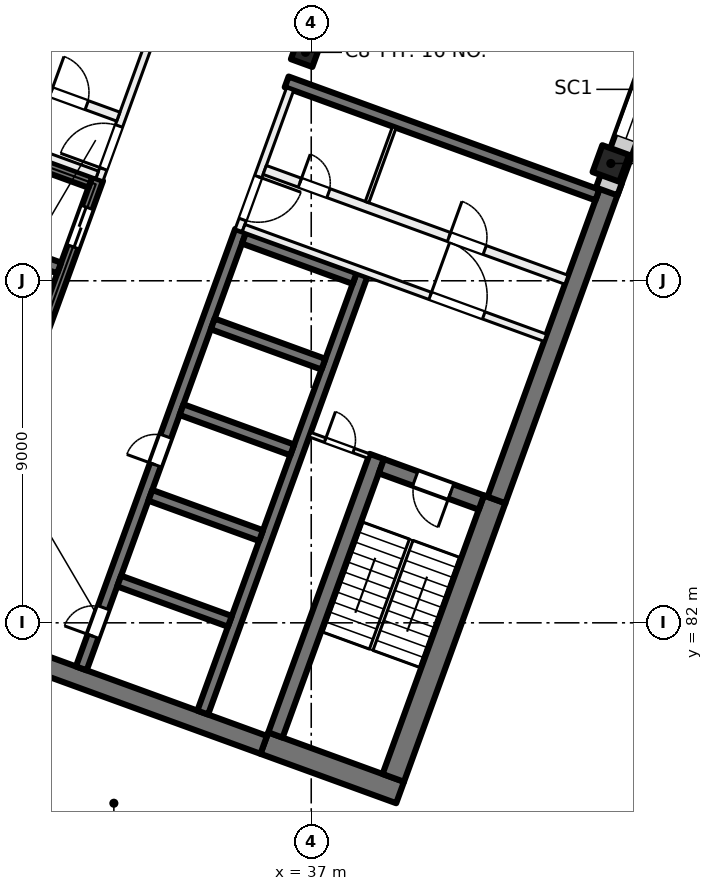
"""IFC4 building model, lengths in metres.
Left out: names, types, materials, properties, quantities, classifications, styles, units other than length and angle.
Written with IfcOpenShell. Run it as: python <this file> out.ifc"""

import sys

from ifc_helpers import new_model, si_unit, direction, frame, frame_2d, origin, origin_2d, place, context, subcontext, project, spatial, rectangle, extrude, element, fill, save


model = new_model("IFC4")
c1 = context("Model", 3, precision=1e-05, world=origin(), true_north=direction((0.0, 1.0)))
c2 = subcontext(c1, "Body", "Model", "MODEL_VIEW")
j1 = project(units=[si_unit("LENGTHUNIT", "METRE"), si_unit("PLANEANGLEUNIT", "RADIAN")], contexts=[c1])
p1 = place(None, origin())
s1 = spatial("IfcSite", under=j1, at=p1, CompositionType="ELEMENT")
p2 = place(p1, origin())
s2 = spatial("IfcBuilding", under=s1, at=p2, CompositionType="ELEMENT")
p3 = place(p2, frame((0.0, 0.0, 192.0)))
s3 = spatial("IfcBuildingStorey", under=s2, at=p3, CompositionType="ELEMENT", Elevation=192.0)
p4 = place(p3, frame((36.849, 97.011, 0.0), z_axis=(0.0, 0.0, 1.0), x_axis=(-0.342020143326, -0.939692620786, 0.0)))
e1 = element("IfcColumn", 1, at=p4, inside=s3, PredefinedType="COLUMN", context=c2, shape_type="SweptSolid", body=[
    extrude(rectangle(XDim=0.6, YDim=0.6, at=origin_2d()), origin(), (0.0, 0.0, 1.0), 4.0),
])
p5 = place(p3, frame((44.884, 94.087, 0.0), z_axis=(0.0, 0.0, 1.0), x_axis=(-0.342020143326, -0.939692620786, 0.0)))
e2 = element("IfcColumn", 2, at=p5, inside=s3, PredefinedType="COLUMN", context=c2, shape_type="SweptSolid", body=[
    extrude(rectangle(XDim=0.75, YDim=0.75, at=origin_2d()), origin(), (0.0, 0.0, 1.0), 4.0),
])
p6 = place(p3, frame((39.338, 77.535, 0.0), z_axis=(0.0, 0.0, 1.0), x_axis=(-0.939701471648, 0.341995824804, 0.0)))
e3 = element("IfcWall", 3, at=p6, inside=s3, PredefinedType="SHEAR", context=c2, shape_type="SweptSolid", body=[
    extrude(rectangle(XDim=3.8, YDim=0.6, at=frame_2d((1.9, 0.0))), origin(), (0.0, 0.0, 1.0), 4.0),
])
p7 = place(p3, frame((35.75, 78.788, 0.0), z_axis=(0.0, 0.0, 1.0), x_axis=(-0.939692894512, 0.342019391267, 0.0)))
e4 = element("IfcWall", 4, at=p7, inside=s3, PredefinedType="SHEAR", context=c2, shape_type="SweptSolid", body=[
    extrude(rectangle(XDim=14.4, YDim=0.5, at=frame_2d((7.2, 0.0))), origin(), (0.0, 0.0, 1.0), 4.0),
])
p8 = place(p3, frame((39.159, 77.92, 0.0), z_axis=(0.0, 0.0, 1.0), x_axis=(0.342016982193, 0.939693771338, 0.0)))
e5 = element("IfcWall", 5, at=p8, inside=s3, PredefinedType="SHEAR", context=c2, shape_type="SweptSolid", body=[
    extrude(rectangle(XDim=7.8, YDim=0.6, at=frame_2d((3.9, 0.0))), origin(), (0.0, 0.0, 1.0), 4.0),
])
p9 = place(p3, frame((41.874, 85.232, 0.0), z_axis=(0.0, 0.0, 1.0), x_axis=(0.342020437038, 0.939692513883, 0.0)))
e6 = element("IfcWall", 6, at=p9, inside=s3, PredefinedType="SHEAR", context=c2, shape_type="SweptSolid", body=[
    extrude(rectangle(XDim=8.975, YDim=0.5, at=frame_2d((4.487, 0.0))), origin(), (0.0, 0.0, 1.0), 4.0),
])
p10 = place(p3, frame((36.058, 79.048, 0.0), z_axis=(0.0, 0.0, 1.0), x_axis=(0.342016982193, 0.939693771338, 0.0)))
e7 = element("IfcWall", 7, at=p10, inside=s3, PredefinedType="SHEAR", context=c2, shape_type="SweptSolid", body=[
    extrude(rectangle(XDim=7.8, YDim=0.4, at=frame_2d((3.9, 0.0))), origin(), (0.0, 0.0, 1.0), 4.0),
])
p11 = place(p3, frame((41.476, 85.164, 0.0), z_axis=(0.0, 0.0, 1.0), x_axis=(-0.939678810556, 0.342058084236, 0.0)))
e8 = element("IfcWall", 8, at=p11, inside=s3, PredefinedType="SHEAR", context=c2, shape_type="SweptSolid", body=[
    extrude(rectangle(XDim=2.8, YDim=0.4, at=frame_2d((1.4, 0.0))), origin(), (0.0, 0.0, 1.0), 4.0),
])
p12 = place(p11, frame((0.85, 0.0, 0.0)))
e9 = element("IfcOpeningElement", 9, at=p12, cuts=e8, PredefinedType="OPENING", context=c2, shape_type="SweptSolid", body=[
    extrude(rectangle(XDim=1.0, YDim=2.1, at=frame_2d((0.5, 1.05))), frame((0.0, 0.21, 0.0), z_axis=(0.0, -1.0, 0.0), x_axis=(1.0, 0.0, 0.0)), (0.0, 0.0, 1.0), 0.42),
])
p13 = place(p3, frame((30.949, 80.801, 0.0), z_axis=(0.0, 0.0, 1.0), x_axis=(0.342016684409, 0.939693879721, 0.0)))
e10 = element("IfcWall", 10, at=p13, inside=s3, PredefinedType="SHEAR", context=c2, shape_type="SweptSolid", body=[
    extrude(rectangle(XDim=12.25, YDim=0.3, at=frame_2d((6.125, 0.0))), origin(), (0.0, 0.0, 1.0), 4.0),
])
p14 = place(p13, frame((0.9, 0.0, 0.0)))
e11 = element("IfcOpeningElement", 11, at=p14, cuts=e10, PredefinedType="OPENING", context=c2, shape_type="SweptSolid", body=[
    extrude(rectangle(XDim=0.8, YDim=2.1, at=frame_2d((0.4, 1.05))), frame((0.0, 0.16, 0.0), z_axis=(0.0, -1.0, 0.0), x_axis=(1.0, 0.0, 0.0)), (0.0, 0.0, 1.0), 0.32),
])
p15 = place(p13, frame((5.7, 0.0, 0.0)))
e12 = element("IfcOpeningElement", 12, at=p15, cuts=e10, PredefinedType="OPENING", context=c2, shape_type="SweptSolid", body=[
    extrude(rectangle(XDim=0.8, YDim=2.1, at=frame_2d((0.4, 1.05))), frame((0.0, 0.16, 0.0), z_axis=(0.0, -1.0, 0.0), x_axis=(1.0, 0.0, 0.0)), (0.0, 0.0, 1.0), 0.32),
])
p16 = place(p3, frame((34.144, 79.638, 0.0), z_axis=(0.0, 0.0, 1.0), x_axis=(0.342016684409, 0.939693879721, 0.0)))
e13 = element("IfcWall", 13, at=p16, inside=s3, PredefinedType="SHEAR", context=c2, shape_type="SweptSolid", body=[
    extrude(rectangle(XDim=12.25, YDim=0.3, at=frame_2d((6.125, 0.0))), origin(), (0.0, 0.0, 1.0), 4.0),
])
p17 = place(p3, frame((34.858, 82.039, 0.0), z_axis=(0.0, 0.0, 1.0), x_axis=(-0.939689908313, 0.342027595692, 0.0)))
e14 = element("IfcWall", 14, at=p17, inside=s3, PredefinedType="SHEAR", context=c2, shape_type="SweptSolid", body=[
    extrude(rectangle(XDim=3.1, YDim=0.3, at=frame_2d((1.55, 0.0))), origin(), (0.0, 0.0, 1.0), 4.0),
])
p18 = place(p3, frame((35.679, 84.294, 0.0), z_axis=(0.0, 0.0, 1.0), x_axis=(-0.939706007505, 0.341983361377, 0.0)))
e15 = element("IfcWall", 15, at=p18, inside=s3, PredefinedType="SHEAR", context=c2, shape_type="SweptSolid", body=[
    extrude(rectangle(XDim=3.1, YDim=0.3, at=frame_2d((1.55, 0.0))), origin(), (0.0, 0.0, 1.0), 4.0),
])
for number, where, z_axis, x_axis in (
    (16, (36.5, 86.549, 0.0), (0.0, 0.0, 1.0), (-0.94, 0.342, 0.0)),
    (17, (37.321, 88.805, 0.0), (0.0, 0.0, 1.0), (-0.94, 0.342, 0.0)),
    (18, (38.142, 91.06, 0.0), (0.0, 0.0, 1.0), (-0.94, 0.342, 0.0)),
):
    element("IfcWall", number, at=place(p3, frame(where, z_axis=z_axis, x_axis=x_axis)), inside=s3, PredefinedType="SHEAR", context=c2, shape_type="SweptSolid", body=[
        extrude(rectangle(XDim=3.1, YDim=0.3, at=frame_2d((1.55, 0.0))), origin(), (0.0, 0.0, 1.0), 4.0),
    ])
p19 = place(p3, frame((27.191, 82.169, 0.0), z_axis=(0.0, 0.0, 1.0), x_axis=(0.342016684409, 0.939693879721, 0.0)))
e19 = element("IfcWall", 19, at=p19, inside=s3, PredefinedType="SHEAR", context=c2, shape_type="SweptSolid", body=[
    extrude(rectangle(XDim=12.25, YDim=0.3, at=frame_2d((6.125, 0.0))), origin(), (0.0, 0.0, 1.0), 4.0),
])
p20 = place(p19, frame((0.75, 0.0, 0.0)))
e20 = element("IfcOpeningElement", 20, at=p20, cuts=e19, PredefinedType="OPENING", context=c2, shape_type="SweptSolid", body=[
    extrude(rectangle(XDim=1.1, YDim=2.1, at=frame_2d((0.55, 1.05))), frame((0.0, 0.16, 0.0), z_axis=(0.0, -1.0, 0.0), x_axis=(1.0, 0.0, 0.0)), (0.0, 0.0, 1.0), 0.32),
])
p21 = place(p19, frame((3.15, 0.0, 0.0)))
e21 = element("IfcOpeningElement", 21, at=p21, cuts=e19, PredefinedType="OPENING", context=c2, shape_type="SweptSolid", body=[
    extrude(rectangle(XDim=1.1, YDim=2.1, at=frame_2d((0.55, 1.05))), frame((0.0, 0.16, 0.0), z_axis=(0.0, -1.0, 0.0), x_axis=(1.0, 0.0, 0.0)), (0.0, 0.0, 1.0), 0.32),
])
p22 = place(p19, frame((5.55, 0.0, 0.0)))
e22 = element("IfcOpeningElement", 22, at=p22, cuts=e19, PredefinedType="OPENING", context=c2, shape_type="SweptSolid", body=[
    extrude(rectangle(XDim=1.1, YDim=2.1, at=frame_2d((0.55, 1.05))), frame((0.0, 0.16, 0.0), z_axis=(0.0, -1.0, 0.0), x_axis=(1.0, 0.0, 0.0)), (0.0, 0.0, 1.0), 0.32),
])
p23 = place(p19, frame((10.35, 0.0, 0.0)))
e23 = element("IfcOpeningElement", 23, at=p23, cuts=e19, PredefinedType="OPENING", context=c2, shape_type="SweptSolid", body=[
    extrude(rectangle(XDim=1.1, YDim=2.1, at=frame_2d((0.55, 1.05))), frame((0.0, 0.16, 0.0), z_axis=(0.0, -1.0, 0.0), x_axis=(1.0, 0.0, 0.0)), (0.0, 0.0, 1.0), 0.32),
])
for number, where, z_axis, x_axis in (
    (24, (30.367, 91.336, 0.0), (0.0, 0.0, 1.0), (-0.94, 0.342, 0.0)),
    (25, (31.188, 93.591, 0.0), (0.0, 0.0, 1.0), (-0.94, 0.342, 0.0)),
):
    element("IfcWall", number, at=place(p3, frame(where, z_axis=z_axis, x_axis=x_axis)), inside=s3, PredefinedType="SHEAR", context=c2, shape_type="SweptSolid", body=[
        extrude(rectangle(XDim=3.1, YDim=0.3, at=frame_2d((1.55, 0.0))), origin(), (0.0, 0.0, 1.0), 4.0),
    ])
p24 = place(p3, frame((44.529, 93.258, 0.0), z_axis=(0.0, 0.0, 1.0), x_axis=(-0.9396917844, 0.342022441267, 0.0)))
e26 = element("IfcWall", 26, at=p24, inside=s3, PredefinedType="SHEAR", context=c2, shape_type="SweptSolid", body=[
    extrude(rectangle(XDim=8.7, YDim=0.3, at=frame_2d((4.35, 0.0))), origin(), (0.0, 0.0, 1.0), 4.0),
])
p25 = place(p3, frame((52.212, 113.783, 0.0), z_axis=(0.0, 0.0, 1.0), x_axis=(-0.34202521188, -0.939690775968, 0.0)))
e27 = element("IfcWall", 27, at=p25, inside=s3, PredefinedType="SOLIDWALL", context=c2, shape_type="SweptSolid", body=[
    extrude(rectangle(XDim=21.745, YDim=0.6, at=frame_2d((10.873, 0.0))), origin(), (0.0, 0.0, 1.0), 3.625),
])
p26 = place(p25, frame((4.365, 0.0, 0.0)))
e28 = element("IfcOpeningElement", 28, at=p26, cuts=e27, PredefinedType="OPENING", context=c2, shape_type="SweptSolid", body=[
    extrude(rectangle(XDim=1.8, YDim=2.4, at=frame_2d((0.9, 1.2))), frame((0.0, 0.31, 0.0), z_axis=(0.0, -1.0, 0.0), x_axis=(1.0, 0.0, 0.0)), (0.0, 0.0, 1.0), 0.62),
])
p27 = place(p25, frame((8.265, 0.0, 0.9)))
e29 = element("IfcOpeningElement", 29, at=p27, cuts=e27, PredefinedType="OPENING", context=c2, shape_type="SweptSolid", body=[
    extrude(rectangle(XDim=3.0, YDim=2.4, at=frame_2d((1.5, 1.2))), frame((0.0, 0.31, 0.0), z_axis=(0.0, -1.0, 0.0), x_axis=(1.0, 0.0, 0.0)), (0.0, 0.0, 1.0), 0.62),
])
p28 = place(p25, frame((12.765, 0.0, 0.9)))
e30 = element("IfcOpeningElement", 30, at=p28, cuts=e27, PredefinedType="OPENING", context=c2, shape_type="SweptSolid", body=[
    extrude(rectangle(XDim=3.0, YDim=2.4, at=frame_2d((1.5, 1.2))), frame((0.0, 0.31, 0.0), z_axis=(0.0, -1.0, 0.0), x_axis=(1.0, 0.0, 0.0)), (0.0, 0.0, 1.0), 0.62),
])
p29 = place(p25, frame((17.265, 0.0, 0.9)))
e31 = element("IfcOpeningElement", 31, at=p29, cuts=e27, PredefinedType="OPENING", context=c2, shape_type="SweptSolid", body=[
    extrude(rectangle(XDim=3.0, YDim=2.4, at=frame_2d((1.5, 1.2))), frame((0.0, 0.31, 0.0), z_axis=(0.0, -1.0, 0.0), x_axis=(1.0, 0.0, 0.0)), (0.0, 0.0, 1.0), 0.62),
])
p30 = place(p3, frame((31.427, 93.663, 0.0), z_axis=(0.0, 0.0, 1.0), x_axis=(0.342030870568, 0.93968871632, 0.0)))
e32 = element("IfcWall", 32, at=p30, inside=s3, PredefinedType="PARTITIONING", context=c2, shape_type="SweptSolid", body=[
    extrude(rectangle(XDim=3.95, YDim=0.2, at=frame_2d((1.975, 0.0))), origin(), (0.0, 0.0, 1.0), 3.625),
])
p31 = place(p30, frame((0.3, 0.0, 0.0)))
e33 = element("IfcOpeningElement", 33, at=p31, cuts=e32, PredefinedType="OPENING", context=c2, shape_type="SweptSolid", body=[
    extrude(rectangle(XDim=1.2, YDim=2.1, at=frame_2d((0.6, 1.05))), frame((0.0, 0.11, 0.0), z_axis=(0.0, -1.0, 0.0), x_axis=(1.0, 0.0, 0.0)), (0.0, 0.0, 1.0), 0.22),
])
p32 = place(p3, frame((23.427, 96.682, 0.0), z_axis=(0.0, 0.0, 1.0), x_axis=(0.939690465531, -0.342026064782, 0.0)))
e34 = element("IfcWall", 34, at=p32, inside=s3, PredefinedType="PARTITIONING", context=c2, shape_type="SweptSolid", body=[
    extrude(rectangle(XDim=8.45, YDim=0.2, at=frame_2d((4.225, 0.0))), origin(), (0.0, 0.0, 1.0), 3.625),
])
p33 = place(p32, frame((1.725, 0.0, 0.0)))
e35 = element("IfcOpeningElement", 35, at=p33, cuts=e34, PredefinedType="OPENING", context=c2, shape_type="SweptSolid", body=[
    extrude(rectangle(XDim=1.5, YDim=2.1, at=frame_2d((0.75, 1.05))), frame((0.0, 0.11, 0.0), z_axis=(0.0, -1.0, 0.0), x_axis=(1.0, 0.0, 0.0)), (0.0, 0.0, 1.0), 0.22),
])
p34 = place(p3, frame((23.983, 98.208, 0.0), z_axis=(0.0, 0.0, 1.0), x_axis=(0.939699751196, -0.342000552051, 0.0)))
e36 = element("IfcWall", 36, at=p34, inside=s3, PredefinedType="PARTITIONING", context=c2, shape_type="SweptSolid", body=[
    extrude(rectangle(XDim=8.45, YDim=0.25, at=frame_2d((4.225, 0.0))), origin(), (0.0, 0.0, 1.0), 3.625),
])
p35 = place(p34, frame((6.565, 0.0, 0.0)))
e37 = element("IfcOpeningElement", 37, at=p35, cuts=e36, PredefinedType="OPENING", context=c2, shape_type="SweptSolid", body=[
    extrude(rectangle(XDim=1.0, YDim=2.1, at=frame_2d((0.5, 1.05))), frame((0.0, 0.135, 0.0), z_axis=(0.0, -1.0, 0.0), x_axis=(1.0, 0.0, 0.0)), (0.0, 0.0, 1.0), 0.27),
])
p36 = place(p34, frame((2.39, 0.0, 0.0)))
e38 = element("IfcOpeningElement", 38, at=p36, cuts=e36, PredefinedType="OPENING", context=c2, shape_type="SweptSolid", body=[
    extrude(rectangle(XDim=0.8, YDim=2.1, at=frame_2d((0.4, 1.05))), frame((0.0, 0.135, 0.0), z_axis=(0.0, -1.0, 0.0), x_axis=(1.0, 0.0, 0.0)), (0.0, 0.0, 1.0), 0.27),
])
p37 = place(p3, frame((36.443, 96.041, 0.0), z_axis=(0.0, 0.0, 1.0), x_axis=(-0.341996156931, -0.939701350773, 0.0)))
e39 = element("IfcWall", 39, at=p37, inside=s3, PredefinedType="PARTITIONING", context=c2, shape_type="SweptSolid", body=[
    extrude(rectangle(XDim=3.95, YDim=0.2, at=frame_2d((1.975, 0.0))), origin(), (0.0, 0.0, 1.0), 3.625),
])
p38 = place(p37, frame((2.45, 0.0, 0.0)))
e40 = element("IfcOpeningElement", 40, at=p38, cuts=e39, PredefinedType="OPENING", context=c2, shape_type="SweptSolid", body=[
    extrude(rectangle(XDim=1.2, YDim=2.1, at=frame_2d((0.6, 1.05))), frame((0.0, 0.11, 0.0), z_axis=(0.0, -1.0, 0.0), x_axis=(1.0, 0.0, 0.0)), (0.0, 0.0, 1.0), 0.22),
])
p39 = place(p3, frame((35.22, 92.389, 0.0), z_axis=(0.0, 0.0, 1.0), x_axis=(0.939690465531, -0.342026064782, 0.0)))
e41 = element("IfcWall", 41, at=p39, inside=s3, PredefinedType="PARTITIONING", context=c2, shape_type="SweptSolid", body=[
    extrude(rectangle(XDim=8.45, YDim=0.2, at=frame_2d((4.225, 0.0))), origin(), (0.0, 0.0, 1.0), 3.625),
])
p40 = place(p39, frame((5.225, 0.0, 0.0)))
e42 = element("IfcOpeningElement", 42, at=p40, cuts=e41, PredefinedType="OPENING", context=c2, shape_type="SweptSolid", body=[
    extrude(rectangle(XDim=1.5, YDim=2.1, at=frame_2d((0.75, 1.05))), frame((0.0, 0.11, 0.0), z_axis=(0.0, -1.0, 0.0), x_axis=(1.0, 0.0, 0.0)), (0.0, 0.0, 1.0), 0.22),
])
p41 = place(p3, frame((35.776, 93.916, 0.0), z_axis=(0.0, 0.0, 1.0), x_axis=(0.939690465531, -0.342026064782, 0.0)))
e43 = element("IfcWall", 43, at=p41, inside=s3, PredefinedType="PARTITIONING", context=c2, shape_type="SweptSolid", body=[
    extrude(rectangle(XDim=8.45, YDim=0.25, at=frame_2d((4.225, 0.0))), origin(), (0.0, 0.0, 1.0), 3.625),
])
p42 = place(p41, frame((0.985, 0.0, 0.0)))
e44 = element("IfcOpeningElement", 44, at=p42, cuts=e43, PredefinedType="OPENING", context=c2, shape_type="SweptSolid", body=[
    extrude(rectangle(XDim=0.8, YDim=2.1, at=frame_2d((0.4, 1.05))), frame((0.0, 0.135, 0.0), z_axis=(0.0, -1.0, 0.0), x_axis=(1.0, 0.0, 0.0)), (0.0, 0.0, 1.0), 0.27),
])
p43 = place(p41, frame((5.16, 0.0, 0.0)))
e45 = element("IfcOpeningElement", 45, at=p43, cuts=e43, PredefinedType="OPENING", context=c2, shape_type="SweptSolid", body=[
    extrude(rectangle(XDim=1.0, YDim=2.1, at=frame_2d((0.5, 1.05))), frame((0.0, 0.135, 0.0), z_axis=(0.0, -1.0, 0.0), x_axis=(1.0, 0.0, 0.0)), (0.0, 0.0, 1.0), 0.27),
])
p44 = place(p3, frame((36.966, 86.952, 0.0), z_axis=(0.0, 0.0, 1.0), x_axis=(0.939672407396, -0.342075674051, 0.0)))
e46 = element("IfcWall", 46, at=p44, inside=s3, PredefinedType="PARTITIONING", context=c2, shape_type="SweptSolid", body=[
    extrude(rectangle(XDim=1.65, YDim=0.125, at=frame_2d((0.825, 0.0))), origin(), (0.0, 0.0, 1.0), 3.625),
])
p45 = place(p44, frame((0.425, 0.0, 0.0)))
e47 = element("IfcOpeningElement", 47, at=p45, cuts=e46, PredefinedType="OPENING", context=c2, shape_type="SweptSolid", body=[
    extrude(rectangle(XDim=0.8, YDim=2.1, at=frame_2d((0.4, 1.05))), frame((0.0, 0.073, 0.0), z_axis=(0.0, -1.0, 0.0), x_axis=(1.0, 0.0, 0.0)), (0.0, 0.0, 1.0), 0.145),
])
p46 = place(p3, frame((39.187, 95.042, 0.0), z_axis=(0.0, 0.0, 1.0), x_axis=(-0.342023078919, -0.939691552312, 0.0)))
e48 = element("IfcWall", 48, at=p46, inside=s3, PredefinedType="PARTITIONING", context=c2, shape_type="SweptSolid", body=[
    extrude(rectangle(XDim=2.1, YDim=0.1, at=frame_2d((1.05, 0.0))), origin(), (0.0, 0.0, 1.0), 3.625),
])
p47 = place(p29, origin())
e49 = element("IfcWindow", 49, at=p47, inside=s3, PartitioningType="SINGLE_PANEL", PredefinedType="WINDOW", context=c2, shape_type="SweptSolid", body=[
    extrude(rectangle(XDim=3.0, YDim=2.4, at=frame_2d((1.5, 1.2))), frame((0.0, 0.03, 0.0), z_axis=(0.0, -1.0, 0.0), x_axis=(1.0, 0.0, 0.0)), (0.0, 0.0, 1.0), 0.06),
])
fill(e31, e49)
p48 = place(p23, origin())
e50 = element("IfcDoor", 50, at=p48, inside=s3, OperationType="DOUBLE_DOOR_SLIDING", PredefinedType="DOOR", context=c2, shape_type="SweptSolid", body=[
    extrude(rectangle(XDim=1.1, YDim=2.1, at=frame_2d((0.55, 1.05))), frame((0.0, 0.025, 0.0), z_axis=(0.0, -1.0, 0.0), x_axis=(1.0, 0.0, 0.0)), (0.0, 0.0, 1.0), 0.05),
])
fill(e23, e50)
p49 = place(p14, origin())
e51 = element("IfcDoor", 51, at=p49, inside=s3, OperationType="SINGLE_SWING_LEFT", PredefinedType="DOOR", context=c2, shape_type="SweptSolid", body=[
    extrude(rectangle(XDim=0.8, YDim=2.1, at=frame_2d((0.4, 1.05))), frame((0.0, 0.025, 0.0), z_axis=(0.0, -1.0, 0.0), x_axis=(1.0, 0.0, 0.0)), (0.0, 0.0, 1.0), 0.05),
])
fill(e11, e51)
p50 = place(p15, origin())
e52 = element("IfcDoor", 52, at=p50, inside=s3, OperationType="SINGLE_SWING_RIGHT", PredefinedType="DOOR", context=c2, shape_type="SweptSolid", body=[
    extrude(rectangle(XDim=0.8, YDim=2.1, at=frame_2d((0.4, 1.05))), frame((0.0, 0.025, 0.0), z_axis=(0.0, -1.0, 0.0), x_axis=(1.0, 0.0, 0.0)), (0.0, 0.0, 1.0), 0.05),
])
fill(e12, e52)
p51 = place(p31, origin())
e53 = element("IfcDoor", 53, at=p51, inside=s3, OperationType="DOUBLE_DOOR_SINGLE_SWING", PredefinedType="DOOR", context=c2, shape_type="SweptSolid", body=[
    extrude(rectangle(XDim=1.2, YDim=2.1, at=frame_2d((0.6, 1.05))), frame((0.0, 0.025, 0.0), z_axis=(0.0, -1.0, 0.0), x_axis=(1.0, 0.0, 0.0)), (0.0, 0.0, 1.0), 0.05),
])
fill(e33, e53)
p52 = place(p35, origin())
e54 = element("IfcDoor", 54, at=p52, inside=s3, OperationType="SINGLE_SWING_LEFT", PredefinedType="DOOR", context=c2, shape_type="SweptSolid", body=[
    extrude(rectangle(XDim=1.0, YDim=2.1, at=frame_2d((0.5, 1.05))), frame((0.0, 0.025, 0.0), z_axis=(0.0, -1.0, 0.0), x_axis=(1.0, 0.0, 0.0)), (0.0, 0.0, 1.0), 0.05),
])
fill(e37, e54)
p53 = place(p38, origin())
e55 = element("IfcDoor", 55, at=p53, inside=s3, OperationType="DOUBLE_DOOR_SINGLE_SWING", PredefinedType="DOOR", context=c2, shape_type="SweptSolid", body=[
    extrude(rectangle(XDim=1.2, YDim=2.1, at=frame_2d((0.6, 1.05))), frame((0.0, 0.025, 0.0), z_axis=(0.0, -1.0, 0.0), x_axis=(1.0, 0.0, 0.0)), (0.0, 0.0, 1.0), 0.05),
])
fill(e40, e55)
p54 = place(p40, origin())
e56 = element("IfcDoor", 56, at=p54, inside=s3, OperationType="DOUBLE_DOOR_SINGLE_SWING", PredefinedType="DOOR", context=c2, shape_type="SweptSolid", body=[
    extrude(rectangle(XDim=1.5, YDim=2.1, at=frame_2d((0.75, 1.05))), frame((0.0, 0.025, 0.0), z_axis=(0.0, -1.0, 0.0), x_axis=(1.0, 0.0, 0.0)), (0.0, 0.0, 1.0), 0.05),
])
fill(e42, e56)
p55 = place(p12, origin())
e57 = element("IfcDoor", 57, at=p55, inside=s3, OperationType="SINGLE_SWING_RIGHT", PredefinedType="DOOR", context=c2, shape_type="SweptSolid", body=[
    extrude(rectangle(XDim=1.0, YDim=2.1, at=frame_2d((0.5, 1.05))), frame((0.0, 0.025, 0.0), z_axis=(0.0, -1.0, 0.0), x_axis=(1.0, 0.0, 0.0)), (0.0, 0.0, 1.0), 0.05),
])
fill(e9, e57)
p56 = place(p45, origin())
e58 = element("IfcDoor", 58, at=p56, inside=s3, OperationType="SINGLE_SWING_LEFT", PredefinedType="DOOR", context=c2, shape_type="SweptSolid", body=[
    extrude(rectangle(XDim=0.8, YDim=2.1, at=frame_2d((0.4, 1.05))), frame((0.0, 0.025, 0.0), z_axis=(0.0, -1.0, 0.0), x_axis=(1.0, 0.0, 0.0)), (0.0, 0.0, 1.0), 0.05),
])
fill(e47, e58)
p57 = place(p42, origin())
e59 = element("IfcDoor", 59, at=p57, inside=s3, OperationType="SINGLE_SWING_RIGHT", PredefinedType="DOOR", context=c2, shape_type="SweptSolid", body=[
    extrude(rectangle(XDim=0.8, YDim=2.1, at=frame_2d((0.4, 1.05))), frame((0.0, 0.025, 0.0), z_axis=(0.0, -1.0, 0.0), x_axis=(1.0, 0.0, 0.0)), (0.0, 0.0, 1.0), 0.05),
])
fill(e44, e59)
p58 = place(p43, origin())
e60 = element("IfcDoor", 60, at=p58, inside=s3, OperationType="SINGLE_SWING_LEFT", PredefinedType="DOOR", context=c2, shape_type="SweptSolid", body=[
    extrude(rectangle(XDim=1.0, YDim=2.1, at=frame_2d((0.5, 1.05))), frame((0.0, 0.025, 0.0), z_axis=(0.0, -1.0, 0.0), x_axis=(1.0, 0.0, 0.0)), (0.0, 0.0, 1.0), 0.05),
])
fill(e45, e60)
save(model, sys.argv[1])
